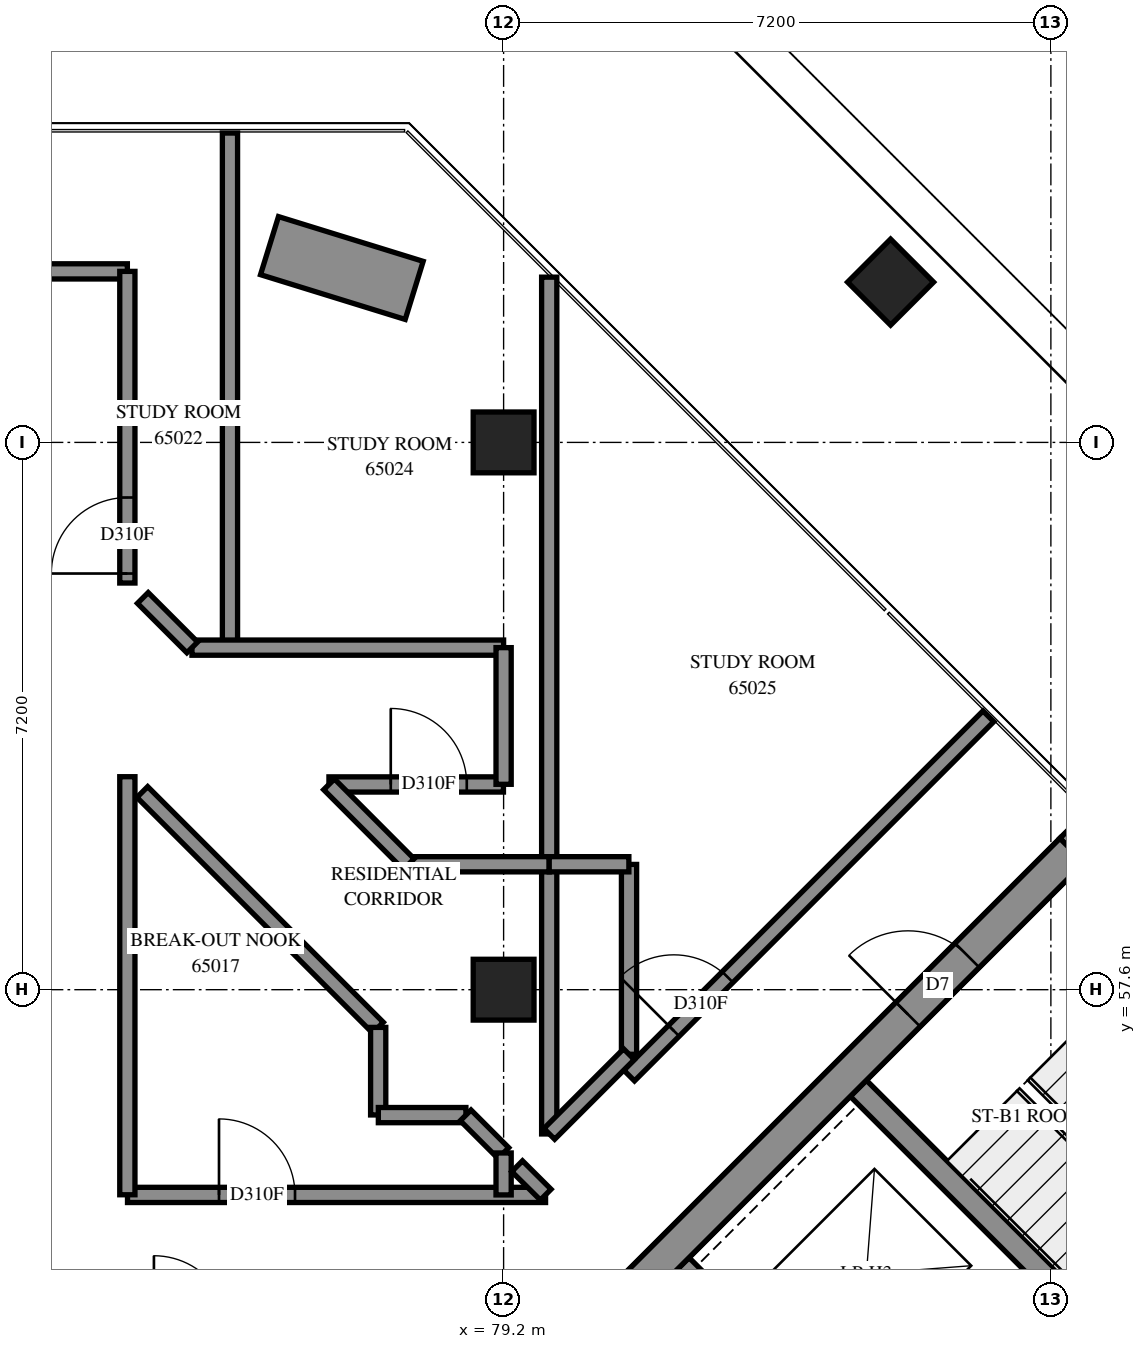
"""IFC4 building model, lengths in metres.
Left out: names, types, materials, properties, quantities, classifications, styles, units other than length and angle.
Written with IfcOpenShell. Run it as: python <this file> out.ifc"""

import sys

from ifc_helpers import new_model, si_unit, direction, frame, frame_2d, origin, origin_2d, place, context, subcontext, project, spatial, rectangle, extrude, element, fill, save


model = new_model("IFC4")
c1 = context("Model", 3, precision=1e-05, world=origin(), true_north=direction((0.0, 1.0)))
c2 = subcontext(c1, "Body", "Model", "MODEL_VIEW")
j1 = project(units=[si_unit("LENGTHUNIT", "METRE"), si_unit("PLANEANGLEUNIT", "RADIAN")], contexts=[c1])
p1 = place(None, origin())
s1 = spatial("IfcSite", under=j1, at=p1, CompositionType="ELEMENT")
p2 = place(p1, origin())
s2 = spatial("IfcBuilding", under=s1, at=p2, CompositionType="ELEMENT")
p3 = place(p2, frame((0.0, 0.0, 239.6)))
s3 = spatial("IfcBuildingStorey", under=s2, at=p3, CompositionType="ELEMENT", Elevation=239.6)
for number, where, z_axis, x_axis in (
    (1, (79.2, 57.6, 0.0), (0.0, 0.0, 1.0), (1.0, 0.0, 0.0)),
    (2, (79.2, 64.8, 0.0), (0.0, 0.0, 1.0), (1.0, 0.0, 0.0)),
    (3, (84.291, 66.909, 0.0), (0.0, 0.0, 1.0), (0.707, -0.707, 0.0)),
):
    element("IfcColumn", number, at=place(p3, frame(where, z_axis=z_axis, x_axis=x_axis)), inside=s3, PredefinedType="COLUMN", context=c2, shape_type="SweptSolid", body=[
        extrude(rectangle(XDim=0.8, YDim=0.8, at=origin_2d()), origin(), (0.0, 0.0, 1.0), 3.9),
    ])
p4 = place(p3, frame((86.678, 59.749, -0.3), z_axis=(0.0, 0.0, 1.0), x_axis=(0.7071035132, -0.7071100491, 0.0)))
e4 = element("IfcWall", 4, at=p4, inside=s3, PredefinedType="SHEAR", context=c2, shape_type="SweptSolid", body=[
    extrude(rectangle(XDim=15.3, YDim=0.45, at=frame_2d((7.65, 0.0))), origin(), (0.0, 0.0, 1.0), 3.5),
])
p5 = place(p4, frame((10.45, 0.0, 0.3)))
e5 = element("IfcOpeningElement", 5, at=p5, cuts=e4, PredefinedType="OPENING", context=c2, shape_type="SweptSolid", body=[
    extrude(rectangle(XDim=0.8, YDim=2.1, at=frame_2d((0.4, 1.05))), frame((0.0, 0.235, 0.0), z_axis=(0.0, -1.0, 0.0), x_axis=(1.0, 0.0, 0.0)), (0.0, 0.0, 1.0), 0.47),
])
p6 = place(p3, frame((76.495, 49.249, -0.3), z_axis=(0.0, 0.0, 1.0), x_axis=(0.7071067812, 0.7071067812, 0.0)))
e6 = element("IfcWall", 6, at=p6, inside=s3, PredefinedType="SHEAR", context=c2, shape_type="SweptSolid", body=[
    extrude(rectangle(XDim=14.4, YDim=0.45, at=frame_2d((7.2, 0.0))), origin(), (0.0, 0.0, 1.0), 3.5),
])
p7 = place(p6, frame((4.55, 0.0, 0.3)))
e7 = element("IfcOpeningElement", 7, at=p7, cuts=e6, PredefinedType="OPENING", context=c2, shape_type="SweptSolid", body=[
    extrude(rectangle(XDim=1.1, YDim=2.1, at=frame_2d((0.55, 1.05))), frame((0.0, 0.235, 0.0), z_axis=(0.0, -1.0, 0.0), x_axis=(1.0, 0.0, 0.0)), (0.0, 0.0, 1.0), 0.47),
])
p8 = place(p6, frame((11.35, 0.0, 0.3)))
e8 = element("IfcOpeningElement", 8, at=p8, cuts=e6, PredefinedType="OPENING", context=c2, shape_type="SweptSolid", body=[
    extrude(rectangle(XDim=1.1, YDim=2.1, at=frame_2d((0.55, 1.05))), frame((0.0, 0.235, 0.0), z_axis=(0.0, -1.0, 0.0), x_axis=(1.0, 0.0, 0.0)), (0.0, 0.0, 1.0), 0.47),
])
p9 = place(p3, frame((81.534, 53.969, 0.0), z_axis=(0.0, 0.0, 1.0), x_axis=(0.707103309, -0.7071102534, 0.0)))
e9 = element("IfcWall", 9, at=p9, inside=s3, PredefinedType="SOLIDWALL", context=c2, shape_type="SweptSolid", body=[
    extrude(rectangle(XDim=14.4, YDim=0.3, at=frame_2d((7.2, 0.0))), origin(), (0.0, 0.0, 1.0), 3.9),
])
p10 = place(p9, frame((1.25, 0.0, 0.0)))
e10 = element("IfcOpeningElement", 10, at=p10, cuts=e9, PredefinedType="OPENING", context=c2, shape_type="SweptSolid", body=[
    extrude(rectangle(XDim=1.1, YDim=2.1, at=frame_2d((0.55, 1.05))), frame((0.0, 0.16, 0.0), z_axis=(0.0, -1.0, 0.0), x_axis=(1.0, 0.0, 0.0)), (0.0, 0.0, 1.0), 0.32),
])
p11 = place(p9, frame((4.85, 0.0, 0.0)))
e11 = element("IfcOpeningElement", 11, at=p11, cuts=e9, PredefinedType="OPENING", context=c2, shape_type="SweptSolid", body=[
    extrude(rectangle(XDim=1.1, YDim=2.1, at=frame_2d((0.55, 1.05))), frame((0.0, 0.16, 0.0), z_axis=(0.0, -1.0, 0.0), x_axis=(1.0, 0.0, 0.0)), (0.0, 0.0, 1.0), 0.32),
])
p12 = place(p9, frame((12.05, 0.0, 0.0)))
e12 = element("IfcOpeningElement", 12, at=p12, cuts=e9, PredefinedType="OPENING", context=c2, shape_type="SweptSolid", body=[
    extrude(rectangle(XDim=1.1, YDim=2.1, at=frame_2d((0.55, 1.05))), frame((0.0, 0.16, 0.0), z_axis=(0.0, -1.0, 0.0), x_axis=(1.0, 0.0, 0.0)), (0.0, 0.0, 1.0), 0.32),
])
p13 = place(p3, frame((83.867, 56.302, 0.0), z_axis=(0.0, 0.0, 1.0), x_axis=(0.7071137256, -0.7070998367, 0.0)))
e13 = element("IfcWall", 13, at=p13, inside=s3, PredefinedType="SOLIDWALL", context=c2, shape_type="SweptSolid", body=[
    extrude(rectangle(XDim=7.2, YDim=0.3, at=frame_2d((3.6, 0.0))), origin(), (0.0, 0.0, 1.0), 3.9),
])
p14 = place(p3, frame((78.024, 66.8, 0.0), z_axis=(0.0, 0.0, 1.0), x_axis=(-0.9553580919, 0.2954503618, 0.0)))
e14 = element("IfcWall", 14, at=p14, inside=s3, PredefinedType="SOLIDWALL", context=c2, shape_type="SweptSolid", body=[
    extrude(rectangle(XDim=1.993, YDim=0.8, at=frame_2d((0.996, 0.0))), origin(), (0.0, 0.0, 1.0), 0.65),
])
p15 = place(p3, frame((55.35, 67.05, 0.0), z_axis=(0.0, 0.0, 1.0), x_axis=(1.0, 0.0, 0.0)))
e15 = element("IfcWall", 15, at=p15, inside=s3, PredefinedType="PARTITIONING", context=c2, shape_type="SweptSolid", body=[
    extrude(rectangle(XDim=18.9, YDim=0.2, at=frame_2d((9.45, 0.0))), origin(), (0.0, 0.0, 1.0), 3.9),
])
p16 = place(p15, frame((9.733, 0.0, 0.0)))
e16 = element("IfcOpeningElement", 16, at=p16, cuts=e15, PredefinedType="OPENING", context=c2, shape_type="SweptSolid", body=[
    extrude(rectangle(XDim=1.0, YDim=2.1, at=frame_2d((0.5, 1.05))), frame((0.0, 0.11, 0.0), z_axis=(0.0, -1.0, 0.0), x_axis=(1.0, 0.0, 0.0)), (0.0, 0.0, 1.0), 0.22),
])
p17 = place(p3, frame((79.8, 59.25, 0.0), z_axis=(0.0, 0.0, 1.0), x_axis=(0.0, 1.0, 0.0)))
e17 = element("IfcWall", 17, at=p17, inside=s3, PredefinedType="PARTITIONING", context=c2, shape_type="SweptSolid", body=[
    extrude(rectangle(XDim=7.724, YDim=0.2, at=frame_2d((3.862, 0.0))), origin(), (0.0, 0.0, 1.0), 3.9),
])
p18 = place(p3, frame((75.6, 62.1, 0.0), z_axis=(0.0, 0.0, 1.0), x_axis=(0.0, 1.0, 0.0)))
e18 = element("IfcWall", 18, at=p18, inside=s3, PredefinedType="PARTITIONING", context=c2, shape_type="SweptSolid", body=[
    extrude(rectangle(XDim=6.77, YDim=0.2, at=frame_2d((3.385, 0.0))), origin(), (0.0, 0.0, 1.0), 3.9),
])
p19 = place(p3, frame((80.852, 56.471, 0.0), z_axis=(0.0, 0.0, 1.0), x_axis=(0.7071067812, 0.7071067812, 0.0)))
e19 = element("IfcWall", 19, at=p19, inside=s3, PredefinedType="PARTITIONING", context=c2, shape_type="SweptSolid", body=[
    extrude(rectangle(XDim=6.684, YDim=0.2, at=frame_2d((3.342, 0.0))), origin(), (0.0, 0.0, 1.0), 3.9),
])
p20 = place(p19, frame((0.832, 0.0, 0.0)))
e20 = element("IfcOpeningElement", 20, at=p20, cuts=e19, PredefinedType="OPENING", context=c2, shape_type="SweptSolid", body=[
    extrude(rectangle(XDim=1.0, YDim=2.1, at=frame_2d((0.5, 1.05))), frame((0.0, 0.11, 0.0), z_axis=(0.0, -1.0, 0.0), x_axis=(1.0, 0.0, 0.0)), (0.0, 0.0, 1.0), 0.22),
])
p21 = place(p3, frame((74.252, 54.9, 0.0), z_axis=(0.0, 0.0, 1.0), x_axis=(1.0, 0.0, 0.0)))
e21 = element("IfcWall", 21, at=p21, inside=s3, PredefinedType="PARTITIONING", context=c2, shape_type="SweptSolid", body=[
    extrude(rectangle(XDim=5.5, YDim=0.2, at=frame_2d((2.75, 0.0))), origin(), (0.0, 0.0, 1.0), 3.9),
])
p22 = place(p21, frame((1.204, 0.0, 0.0)))
e22 = element("IfcOpeningElement", 22, at=p22, cuts=e21, PredefinedType="OPENING", context=c2, shape_type="SweptSolid", body=[
    extrude(rectangle(XDim=1.0, YDim=2.1, at=frame_2d((0.5, 1.05))), frame((0.0, 0.11, 0.0), z_axis=(0.0, -1.0, 0.0), x_axis=(1.0, 0.0, 0.0)), (0.0, 0.0, 1.0), 0.22),
])
p23 = place(p3, frame((74.25, 54.902, 0.0), z_axis=(0.0, 0.0, 1.0), x_axis=(0.0, 1.0, 0.0)))
e23 = element("IfcWall", 23, at=p23, inside=s3, PredefinedType="PARTITIONING", context=c2, shape_type="SweptSolid", body=[
    extrude(rectangle(XDim=5.5, YDim=0.2, at=frame_2d((2.75, 0.0))), origin(), (0.0, 0.0, 1.0), 3.9),
])
p24 = place(p3, frame((74.447, 60.201, 0.0), z_axis=(0.0, 0.0, 1.0), x_axis=(0.7071067812, -0.7071067812, 0.0)))
e24 = element("IfcWall", 24, at=p24, inside=s3, PredefinedType="PARTITIONING", context=c2, shape_type="SweptSolid", body=[
    extrude(rectangle(XDim=4.384, YDim=0.2, at=frame_2d((2.192, 0.0))), origin(), (0.0, 0.0, 1.0), 3.9),
])
p25 = place(p3, frame((75.1, 62.1, 0.0), z_axis=(0.0, 0.0, 1.0), x_axis=(1.0, 0.0, 0.0)))
e25 = element("IfcWall", 25, at=p25, inside=s3, PredefinedType="PARTITIONING", context=c2, shape_type="SweptSolid", body=[
    extrude(rectangle(XDim=4.1, YDim=0.2, at=frame_2d((2.05, 0.0))), origin(), (0.0, 0.0, 1.0), 3.9),
])
p26 = place(p3, frame((74.25, 62.95, 0.0), z_axis=(0.0, 0.0, 1.0), x_axis=(0.0, 1.0, 0.0)))
e26 = element("IfcWall", 26, at=p26, inside=s3, PredefinedType="PARTITIONING", context=c2, shape_type="SweptSolid", body=[
    extrude(rectangle(XDim=4.1, YDim=0.2, at=frame_2d((2.05, 0.0))), origin(), (0.0, 0.0, 1.0), 3.9),
])
p27 = place(p26, frame((0.125, 0.0, 0.0)))
e27 = element("IfcOpeningElement", 27, at=p27, cuts=e26, PredefinedType="OPENING", context=c2, shape_type="SweptSolid", body=[
    extrude(rectangle(XDim=1.0, YDim=2.1, at=frame_2d((0.5, 1.05))), frame((0.0, 0.11, 0.0), z_axis=(0.0, -1.0, 0.0), x_axis=(1.0, 0.0, 0.0)), (0.0, 0.0, 1.0), 0.22),
])
p28 = place(p3, frame((79.8, 55.702, 0.0), z_axis=(0.0, 0.0, 1.0), x_axis=(0.0, 1.0, 0.0)))
e28 = element("IfcWall", 28, at=p28, inside=s3, PredefinedType="PARTITIONING", context=c2, shape_type="SweptSolid", body=[
    extrude(rectangle(XDim=3.548, YDim=0.2, at=frame_2d((1.774, 0.0))), origin(), (0.0, 0.0, 1.0), 3.9),
])
p29 = place(p3, frame((80.85, 56.75, 0.0), z_axis=(0.0, 0.0, 1.0), x_axis=(0.0, 1.0, 0.0)))
e29 = element("IfcWall", 29, at=p29, inside=s3, PredefinedType="PARTITIONING", context=c2, shape_type="SweptSolid", body=[
    extrude(rectangle(XDim=2.498, YDim=0.2, at=frame_2d((1.249, 0.0))), origin(), (0.0, 0.0, 1.0), 3.9),
])
p30 = place(p3, frame((76.902, 60.3, 0.0), z_axis=(0.0, 0.0, 1.0), x_axis=(1.0, 0.0, 0.0)))
e30 = element("IfcWall", 30, at=p30, inside=s3, PredefinedType="PARTITIONING", context=c2, shape_type="SweptSolid", body=[
    extrude(rectangle(XDim=2.296, YDim=0.2, at=frame_2d((1.148, 0.0))), origin(), (0.0, 0.0, 1.0), 3.9),
])
p31 = place(p30, frame((0.813, 0.0, 0.0)))
e31 = element("IfcOpeningElement", 31, at=p31, cuts=e30, PredefinedType="OPENING", context=c2, shape_type="SweptSolid", body=[
    extrude(rectangle(XDim=1.0, YDim=2.1, at=frame_2d((0.5, 1.05))), frame((0.0, 0.11, 0.0), z_axis=(0.0, -1.0, 0.0), x_axis=(1.0, 0.0, 0.0)), (0.0, 0.0, 1.0), 0.22),
])
p32 = place(p3, frame((77.95, 59.25, 0.0), z_axis=(0.0, 0.0, 1.0), x_axis=(1.0, 0.0, 0.0)))
e32 = element("IfcWall", 32, at=p32, inside=s3, PredefinedType="PARTITIONING", context=c2, shape_type="SweptSolid", body=[
    extrude(rectangle(XDim=1.85, YDim=0.2, at=frame_2d((0.925, 0.0))), origin(), (0.0, 0.0, 1.0), 3.9),
])
p33 = place(p3, frame((79.2, 60.302, 0.0), z_axis=(0.0, 0.0, 1.0), x_axis=(0.0, 1.0, 0.0)))
e33 = element("IfcWall", 33, at=p33, inside=s3, PredefinedType="PARTITIONING", context=c2, shape_type="SweptSolid", body=[
    extrude(rectangle(XDim=1.798, YDim=0.2, at=frame_2d((0.899, 0.0))), origin(), (0.0, 0.0, 1.0), 3.9),
])
p34 = place(p3, frame((76.904, 60.302, 0.0), z_axis=(0.0, 0.0, 1.0), x_axis=(0.7064323832, -0.7077805366, 0.0)))
e34 = element("IfcWall", 34, at=p34, inside=s3, PredefinedType="PARTITIONING", context=c2, shape_type="SweptSolid", body=[
    extrude(rectangle(XDim=1.484, YDim=0.2, at=frame_2d((0.742, 0.0))), origin(), (0.0, 0.0, 1.0), 3.9),
])
p35 = place(p3, frame((79.801, 55.703, 0.0), z_axis=(0.0, 0.0, 1.0), x_axis=(0.7071067812, 0.7071067812, 0.0)))
e35 = element("IfcWall", 35, at=p35, inside=s3, PredefinedType="PARTITIONING", context=c2, shape_type="SweptSolid", body=[
    extrude(rectangle(XDim=1.482, YDim=0.2, at=frame_2d((0.741, 0.0))), origin(), (0.0, 0.0, 1.0), 3.9),
])
for number, where, z_axis, x_axis in (
    (36, (77.55, 55.952, 0.0), (0.0, 0.0, 1.0), (0.0, 1.0, 0.0)),
    (37, (77.552, 55.95, 0.0), (0.0, 0.0, 1.0), (1.0, 0.0, 0.0)),
):
    element("IfcWall", number, at=place(p3, frame(where, z_axis=z_axis, x_axis=x_axis)), inside=s3, PredefinedType="PARTITIONING", context=c2, shape_type="SweptSolid", body=[
        extrude(rectangle(XDim=1.152, YDim=0.2, at=frame_2d((0.576, 0.0))), origin(), (0.0, 0.0, 1.0), 3.9),
    ])
p36 = place(p3, frame((79.8, 59.25, 0.0), z_axis=(0.0, 0.0, 1.0), x_axis=(1.0, 0.0, 0.0)))
e38 = element("IfcWall", 38, at=p36, inside=s3, PredefinedType="PARTITIONING", context=c2, shape_type="SweptSolid", body=[
    extrude(rectangle(XDim=1.048, YDim=0.2, at=frame_2d((0.524, 0.0))), origin(), (0.0, 0.0, 1.0), 3.9),
])
p37 = place(p3, frame((74.454, 62.754, 0.0), z_axis=(0.0, 0.0, 1.0), x_axis=(0.7071067812, -0.7071067812, 0.0)))
e39 = element("IfcWall", 39, at=p37, inside=s3, PredefinedType="PARTITIONING", context=c2, shape_type="SweptSolid", body=[
    extrude(rectangle(XDim=0.919, YDim=0.2, at=frame_2d((0.46, 0.0))), origin(), (0.0, 0.0, 1.0), 3.9),
])
p38 = place(p3, frame((78.701, 55.947, 0.0), z_axis=(0.0, 0.0, 1.0), x_axis=(0.7071067812, -0.7071067812, 0.0)))
e40 = element("IfcWall", 40, at=p38, inside=s3, PredefinedType="PARTITIONING", context=c2, shape_type="SweptSolid", body=[
    extrude(rectangle(XDim=0.701, YDim=0.2, at=frame_2d((0.351, 0.0))), origin(), (0.0, 0.0, 1.0), 3.9),
])
p39 = place(p3, frame((79.2, 54.9, 0.0), z_axis=(0.0, 0.0, 1.0), x_axis=(0.0, 1.0, 0.0)))
e41 = element("IfcWall", 41, at=p39, inside=s3, PredefinedType="PARTITIONING", context=c2, shape_type="SweptSolid", body=[
    extrude(rectangle(XDim=0.552, YDim=0.2, at=frame_2d((0.276, 0.0))), origin(), (0.0, 0.0, 1.0), 3.9),
])
p40 = place(p3, frame((79.378, 55.278, 0.0), z_axis=(0.0, 0.0, 1.0), x_axis=(0.7089898784, -0.7052186557, 0.0)))
e42 = element("IfcWall", 42, at=p40, inside=s3, PredefinedType="PARTITIONING", context=c2, shape_type="SweptSolid", body=[
    extrude(rectangle(XDim=0.53, YDim=0.2, at=frame_2d((0.265, 0.0))), origin(), (0.0, 0.0, 1.0), 3.9),
])
p41 = place(p8, origin())
e43 = element("IfcDoor", 43, at=p41, inside=s3, OperationType="SINGLE_SWING_LEFT", PredefinedType="DOOR", context=c2, shape_type="SweptSolid", body=[
    extrude(rectangle(XDim=1.1, YDim=2.1, at=frame_2d((0.55, 1.05))), frame((0.0, 0.025, 0.0), z_axis=(0.0, -1.0, 0.0), x_axis=(1.0, 0.0, 0.0)), (0.0, 0.0, 1.0), 0.05),
])
fill(e8, e43)
p42 = place(p22, origin())
e44 = element("IfcDoor", 44, at=p42, inside=s3, OperationType="SINGLE_SWING_LEFT", PredefinedType="DOOR", context=c2, shape_type="SweptSolid", body=[
    extrude(rectangle(XDim=1.0, YDim=2.1, at=frame_2d((0.5, 1.05))), frame((0.0, 0.025, 0.0), z_axis=(0.0, -1.0, 0.0), x_axis=(1.0, 0.0, 0.0)), (0.0, 0.0, 1.0), 0.05),
])
fill(e22, e44)
p43 = place(p27, origin())
e45 = element("IfcDoor", 45, at=p43, inside=s3, OperationType="SINGLE_SWING_RIGHT", PredefinedType="DOOR", context=c2, shape_type="SweptSolid", body=[
    extrude(rectangle(XDim=1.0, YDim=2.1, at=frame_2d((0.5, 1.05))), frame((0.0, 0.025, 0.0), z_axis=(0.0, -1.0, 0.0), x_axis=(1.0, 0.0, 0.0)), (0.0, 0.0, 1.0), 0.05),
])
fill(e27, e45)
p44 = place(p31, origin())
e46 = element("IfcDoor", 46, at=p44, inside=s3, OperationType="SINGLE_SWING_LEFT", PredefinedType="DOOR", context=c2, shape_type="SweptSolid", body=[
    extrude(rectangle(XDim=1.0, YDim=2.1, at=frame_2d((0.5, 1.05))), frame((0.0, 0.025, 0.0), z_axis=(0.0, -1.0, 0.0), x_axis=(1.0, 0.0, 0.0)), (0.0, 0.0, 1.0), 0.05),
])
fill(e31, e46)
p45 = place(p20, origin())
e47 = element("IfcDoor", 47, at=p45, inside=s3, OperationType="SINGLE_SWING_RIGHT", PredefinedType="DOOR", context=c2, shape_type="SweptSolid", body=[
    extrude(rectangle(XDim=1.0, YDim=2.1, at=frame_2d((0.5, 1.05))), frame((0.0, 0.025, 0.0), z_axis=(0.0, -1.0, 0.0), x_axis=(1.0, 0.0, 0.0)), (0.0, 0.0, 1.0), 0.05),
])
fill(e20, e47)
save(model, sys.argv[1])
